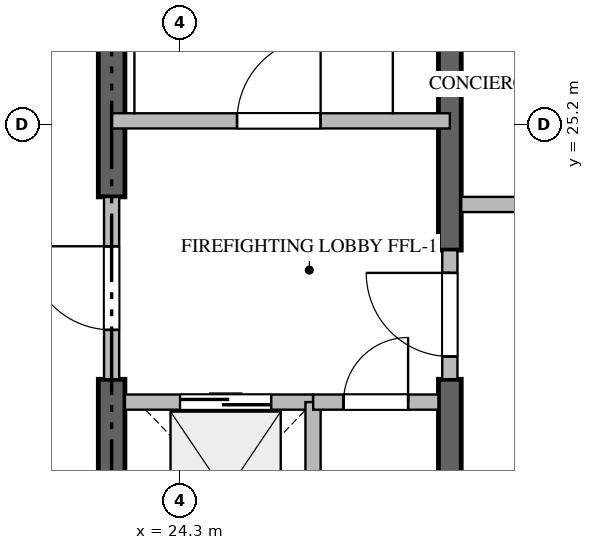
"""IFC4 building model, lengths in metres.
Left out: names, types, materials, properties, quantities, classifications, styles, units other than length and angle.
Written with IfcOpenShell. Run it as: python <this file> out.ifc"""

import sys

from ifc_helpers import new_model, si_unit, direction, frame, frame_2d, origin, place, context, subcontext, project, spatial, rectangle, extrude, source, transform, mapped, element, fill, save


model = new_model("IFC4")
c1 = context("Model", 3, precision=1e-05, world=origin(), true_north=direction((0.0, 1.0)))
c2 = subcontext(c1, "Body", "Model", "MODEL_VIEW")
j1 = project(units=[si_unit("LENGTHUNIT", "METRE"), si_unit("PLANEANGLEUNIT", "RADIAN")], contexts=[c1])
p1 = place(None, origin())
s1 = spatial("IfcSite", under=j1, at=p1, CompositionType="ELEMENT")
p2 = place(p1, origin())
s2 = spatial("IfcBuilding", under=s1, at=p2, CompositionType="ELEMENT")
p3 = place(p2, frame((0.0, 0.0, 347.95)))
s3 = spatial("IfcBuildingStorey", under=s2, at=p3, CompositionType="ELEMENT", Elevation=347.95)
p4 = place(p3, frame((23.4, 16.975, -0.26), z_axis=(0.0, 0.0, 1.0), x_axis=(0.0, 1.0, 0.0)))
e1 = element("IfcWall", 1, at=p4, inside=s3, PredefinedType="SHEAR", context=c2, shape_type="SweptSolid", body=[
    extrude(rectangle(XDim=4.875, YDim=0.35, at=frame_2d((2.438, 0.0))), origin(), (0.0, 0.0, 1.0), 5.898),
])
p5 = place(p3, frame((23.4, 24.25, -0.26), z_axis=(0.0, 0.0, 1.0), x_axis=(0.0, 1.0, 0.0)))
e2 = element("IfcWall", 2, at=p5, inside=s3, PredefinedType="SHEAR", context=c2, shape_type="SweptSolid", body=[
    extrude(rectangle(XDim=9.175, YDim=0.35, at=frame_2d((4.587, 0.0))), origin(), (0.0, 0.0, 1.0), 5.898),
])
p6 = place(p3, frame((27.85, 16.975, -0.26), z_axis=(0.0, 0.0, 1.0), x_axis=(0.0, 1.0, 0.0)))
e3 = element("IfcWall", 3, at=p6, inside=s3, PredefinedType="SHEAR", context=c2, shape_type="SweptSolid", body=[
    extrude(rectangle(XDim=4.875, YDim=0.3, at=frame_2d((2.438, 0.0))), origin(), (0.0, 0.0, 1.0), 5.898),
])
p7 = place(p3, frame((27.85, 23.55, -0.26), z_axis=(0.0, 0.0, 1.0), x_axis=(0.0, 1.0, 0.0)))
e4 = element("IfcWall", 4, at=p7, inside=s3, PredefinedType="SHEAR", context=c2, shape_type="SweptSolid", body=[
    extrude(rectangle(XDim=9.875, YDim=0.3, at=frame_2d((4.938, 0.0))), origin(), (0.0, 0.0, 1.0), 5.898),
])
p8 = place(p3, frame((23.4, 25.25, 0.0), z_axis=(0.0, 0.0, 1.0), x_axis=(1.0, 0.0, 0.0)))
e5 = element("IfcWall", 5, at=p8, inside=s3, PredefinedType="STANDARD", context=c2, shape_type="SweptSolid", body=[
    extrude(rectangle(XDim=4.45, YDim=0.2, at=frame_2d((2.225, 0.0))), origin(), (0.0, 0.0, 1.0), 5.64),
])
p9 = place(p8, frame((1.65, 0.0, 0.0)))
e6 = element("IfcOpeningElement", 6, at=p9, cuts=e5, PredefinedType="OPENING", context=c2, shape_type="SweptSolid", body=[
    extrude(rectangle(XDim=1.1, YDim=2.15, at=frame_2d((0.55, 1.075))), frame((0.0, 0.11, 0.0), z_axis=(0.0, -1.0, 0.0), x_axis=(1.0, 0.0, 0.0)), (0.0, 0.0, 1.0), 0.22),
])
p10 = place(p3, frame((23.575, 21.55, 0.0), z_axis=(0.0, 0.0, 1.0), x_axis=(1.0, 0.0, 0.0)))
e7 = element("IfcWall", 7, at=p10, inside=s3, PredefinedType="STANDARD", context=c2, shape_type="SweptSolid", body=[
    extrude(rectangle(XDim=2.475, YDim=0.2, at=frame_2d((1.238, 0.0))), origin(), (0.0, 0.0, 1.0), 5.64),
])
p11 = place(p10, frame((0.725, 0.0, 0.0)))
e8 = element("IfcOpeningElement", 8, at=p11, cuts=e7, PredefinedType="OPENING", context=c2, shape_type="SweptSolid", body=[
    extrude(rectangle(XDim=1.2, YDim=2.2, at=frame_2d((0.6, 1.1))), frame((0.0, 0.11, 0.0), z_axis=(0.0, -1.0, 0.0), x_axis=(1.0, 0.0, 0.0)), (0.0, 0.0, 1.0), 0.22),
])
p12 = place(p3, frame((26.05, 19.05, 0.0), z_axis=(0.0, 0.0, 1.0), x_axis=(0.0, 1.0, 0.0)))
e9 = element("IfcWall", 9, at=p12, inside=s3, PredefinedType="STANDARD", context=c2, shape_type="SweptSolid", body=[
    extrude(rectangle(XDim=2.5, YDim=0.2, at=frame_2d((1.25, 0.0))), origin(), (0.0, 0.0, 1.0), 5.64),
])
p13 = place(p3, frame((26.052, 21.55, 0.0), z_axis=(0.0, 0.0, 1.0), x_axis=(1.0, 0.0, 0.0)))
e10 = element("IfcWall", 10, at=p13, inside=s3, PredefinedType="STANDARD", context=c2, shape_type="SweptSolid", body=[
    extrude(rectangle(XDim=1.648, YDim=0.2, at=frame_2d((0.824, 0.0))), origin(), (0.0, 0.0, 1.0), 5.64),
])
p14 = place(p13, frame((0.399, 0.0, 0.0)))
e11 = element("IfcOpeningElement", 11, at=p14, cuts=e10, PredefinedType="OPENING", context=c2, shape_type="SweptSolid", body=[
    extrude(rectangle(XDim=0.85, YDim=2.1, at=frame_2d((0.425, 1.05))), frame((0.0, 0.11, 0.0), z_axis=(0.0, -1.0, 0.0), x_axis=(1.0, 0.0, 0.0)), (0.0, 0.0, 1.0), 0.22),
])
p15 = place(p3, frame((23.4, 21.852, 0.0), z_axis=(0.0, 0.0, 1.0), x_axis=(0.0, 1.0, 0.0)))
e12 = element("IfcWall", 12, at=p15, inside=s3, PredefinedType="STANDARD", context=c2, shape_type="SweptSolid", body=[
    extrude(rectangle(XDim=2.396, YDim=0.2, at=frame_2d((1.198, 0.0))), origin(), (0.0, 0.0, 1.0), 5.64),
])
p16 = place(p15, frame((0.648, 0.0, 0.0)))
e13 = element("IfcOpeningElement", 13, at=p16, cuts=e12, PredefinedType="OPENING", context=c2, shape_type="SweptSolid", body=[
    extrude(rectangle(XDim=1.1, YDim=2.15, at=frame_2d((0.55, 1.075))), frame((0.0, 0.11, 0.0), z_axis=(0.0, -1.0, 0.0), x_axis=(1.0, 0.0, 0.0)), (0.0, 0.0, 1.0), 0.22),
])
p17 = place(p3, frame((27.85, 21.852, 0.0), z_axis=(0.0, 0.0, 1.0), x_axis=(0.0, 1.0, 0.0)))
e14 = element("IfcWall", 14, at=p17, inside=s3, PredefinedType="STANDARD", context=c2, shape_type="SweptSolid", body=[
    extrude(rectangle(XDim=1.696, YDim=0.2, at=frame_2d((0.848, 0.0))), origin(), (0.0, 0.0, 1.0), 5.64),
])
p18 = place(p17, frame((0.298, 0.0, 0.0)))
e15 = element("IfcOpeningElement", 15, at=p18, cuts=e14, PredefinedType="OPENING", context=c2, shape_type="SweptSolid", body=[
    extrude(rectangle(XDim=1.1, YDim=2.15, at=frame_2d((0.55, 1.075))), frame((0.0, 0.11, 0.0), z_axis=(0.0, -1.0, 0.0), x_axis=(1.0, 0.0, 0.0)), (0.0, 0.0, 1.0), 0.22),
])
p19 = place(p3, frame((28.0, 24.15, 0.0), z_axis=(0.0, 0.0, 1.0), x_axis=(1.0, 0.0, 0.0)))
e16 = element("IfcWall", 16, at=p19, inside=s3, PredefinedType="STANDARD", context=c2, shape_type="SweptSolid", body=[
    extrude(rectangle(XDim=3.45, YDim=0.2, at=frame_2d((1.725, 0.0))), origin(), (0.0, 0.0, 1.0), 5.64),
])
p20 = place(p19, frame((1.3, 0.0, 0.0)))
e17 = element("IfcOpeningElement", 17, at=p20, cuts=e16, PredefinedType="OPENING", context=c2, shape_type="SweptSolid", body=[
    extrude(rectangle(XDim=0.85, YDim=2.1, at=frame_2d((0.425, 1.05))), frame((0.0, 0.11, 0.0), z_axis=(0.0, -1.0, 0.0), x_axis=(1.0, 0.0, 0.0)), (0.0, 0.0, 1.0), 0.22),
])
m1 = source(origin(), c2, "Body", "SweptSolid", [
    extrude(rectangle(XDim=1.1, YDim=2.15, at=frame_2d((0.55, 1.075))), frame((0.0, 0.025, 0.0), z_axis=(0.0, -1.0, 0.0), x_axis=(1.0, 0.0, 0.0)), (0.0, 0.0, 1.0), 0.05),
])
p21 = place(p9, origin())
e18 = element("IfcDoor", 18, at=p21, inside=s3, OperationType="SINGLE_SWING_RIGHT", PredefinedType="DOOR", context=c2, shape_type="MappedRepresentation", body=[
    mapped(m1, transform((0.0, 0.0, 0.0), scale=1.0)),
])
fill(e6, e18)
m2 = source(origin(), c2, "Body", "SweptSolid", [
    extrude(rectangle(XDim=1.2, YDim=2.2, at=frame_2d((0.6, 1.1))), frame((0.0, 0.025, 0.0), z_axis=(0.0, -1.0, 0.0), x_axis=(1.0, 0.0, 0.0)), (0.0, 0.0, 1.0), 0.05),
])
p22 = place(p11, origin())
e19 = element("IfcDoor", 19, at=p22, inside=s3, OperationType="DOUBLE_DOOR_SLIDING", PredefinedType="DOOR", context=c2, shape_type="MappedRepresentation", body=[
    mapped(m2, transform((0.0, 0.0, 0.0), scale=1.0)),
])
fill(e8, e19)
m3 = source(origin(), c2, "Body", "SweptSolid", [
    extrude(rectangle(XDim=0.85, YDim=2.1, at=frame_2d((0.425, 1.05))), frame((0.0, 0.025, 0.0), z_axis=(0.0, -1.0, 0.0), x_axis=(1.0, 0.0, 0.0)), (0.0, 0.0, 1.0), 0.05),
])
p23 = place(p14, origin())
e20 = element("IfcDoor", 20, at=p23, inside=s3, OperationType="SINGLE_SWING_RIGHT", PredefinedType="DOOR", context=c2, shape_type="MappedRepresentation", body=[
    mapped(m3, transform((0.0, 0.0, 0.0), scale=1.0)),
])
fill(e11, e20)
p24 = place(p16, origin())
e21 = element("IfcDoor", 21, at=p24, inside=s3, OperationType="SINGLE_SWING_RIGHT", PredefinedType="DOOR", context=c2, shape_type="MappedRepresentation", body=[
    mapped(m1, transform((0.0, 0.0, 0.0), scale=1.0)),
])
fill(e13, e21)
p25 = place(p18, origin())
e22 = element("IfcDoor", 22, at=p25, inside=s3, OperationType="SINGLE_SWING_RIGHT", PredefinedType="DOOR", context=c2, shape_type="MappedRepresentation", body=[
    mapped(m1, transform((0.0, 0.0, 0.0), scale=1.0)),
])
fill(e15, e22)
save(model, sys.argv[1])
